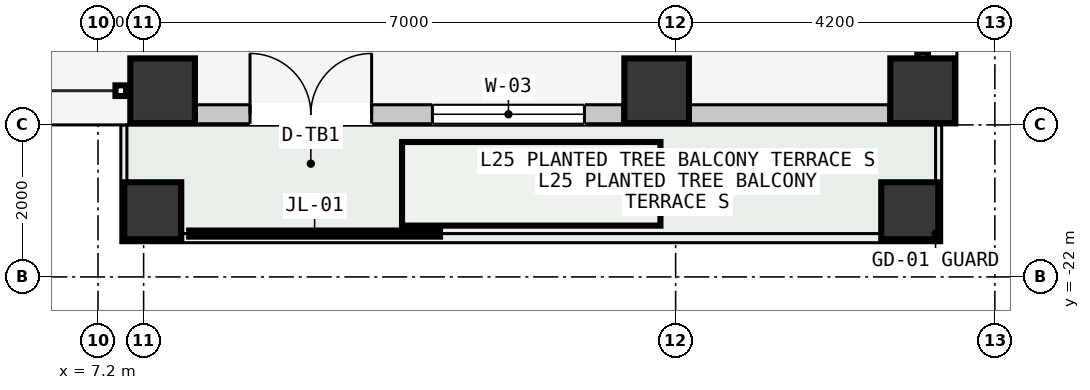
"""IFC4 building model, lengths in metres.
Left out: names, types, materials, properties, quantities, classifications, styles, units other than length and angle.
Written with IfcOpenShell. Run it as: python <this file> out.ifc"""

import sys

from ifc_helpers import new_model, si_unit, direction, frame, frame_2d, origin, origin_2d, place, context, subcontext, project, spatial, rectangle, hollow_rectangle, extrude, element, fill, save


model = new_model("IFC4")
c1 = context("Model", 3, precision=1e-05, world=origin(), true_north=direction((0.0, 1.0)))
c2 = subcontext(c1, "Body", "Model", "MODEL_VIEW")
j1 = project(units=[si_unit("LENGTHUNIT", "METRE"), si_unit("PLANEANGLEUNIT", "RADIAN")], contexts=[c1])
p1 = place(None, origin())
s1 = spatial("IfcSite", under=j1, at=p1, CompositionType="ELEMENT")
p2 = place(p1, origin())
s2 = spatial("IfcBuilding", under=s1, at=p2, CompositionType="ELEMENT")
p3 = place(p2, frame((0.0, 0.0, 99.0)))
s3 = spatial("IfcBuildingStorey", under=s2, at=p3, CompositionType="ELEMENT", Elevation=99.0)
for number, where, z_axis, x_axis in (
    (1, (8.05, -19.55, 0.0), (0.0, 0.0, 1.0), (1.0, 0.0, 0.0)),
    (2, (14.55, -19.55, 0.0), (0.0, 0.0, 1.0), (1.0, 0.0, 0.0)),
    (3, (18.05, -19.55, 0.0), (0.0, 0.0, 1.0), (1.0, 0.0, 0.0)),
):
    element("IfcColumn", number, at=place(p3, frame(where, z_axis=z_axis, x_axis=x_axis)), inside=s3, PredefinedType="COLUMN", context=c2, shape_type="SweptSolid", body=[
        extrude(hollow_rectangle(XDim=0.85, YDim=0.85, WallThickness=0.04, at=origin_2d()), origin(), (0.0, 0.0, 1.0), 3.6),
    ])
for number, where, z_axis, x_axis in (
    (4, (7.92, -21.13, 0.0), (0.0, 0.0, 1.0), (1.0, 0.0, 0.0)),
    (5, (17.88, -21.13, 0.0), (0.0, 0.0, 1.0), (1.0, 0.0, 0.0)),
):
    element("IfcColumn", number, at=place(p3, frame(where, z_axis=z_axis, x_axis=x_axis)), inside=s3, PredefinedType="COLUMN", context=c2, shape_type="SweptSolid", body=[
        extrude(hollow_rectangle(XDim=0.75, YDim=0.75, WallThickness=0.032, at=origin_2d()), origin(), (0.0, 0.0, 1.0), 3.6),
    ])
p4 = place(p3, frame((8.495, -19.86, 0.0), z_axis=(0.0, 0.0, 1.0), x_axis=(1.0, 0.0, 0.0)))
e6 = element("IfcWall", 6, at=p4, inside=s3, PredefinedType="STANDARD", context=c2, shape_type="SweptSolid", body=[
    extrude(rectangle(XDim=5.61, YDim=0.25, at=frame_2d((2.805, 0.0))), origin(), (0.0, 0.0, 1.0), 3.4),
])
p5 = place(p4, frame((0.705, 0.0, 0.0)))
e7 = element("IfcOpeningElement", 7, at=p5, cuts=e6, PredefinedType="OPENING", context=c2, shape_type="SweptSolid", body=[
    extrude(rectangle(XDim=1.6, YDim=2.2, at=frame_2d((0.8, 1.1))), frame((0.0, 0.135, 0.0), z_axis=(0.0, -1.0, 0.0), x_axis=(1.0, 0.0, 0.0)), (0.0, 0.0, 1.0), 0.27),
])
p6 = place(p4, frame((3.105, 0.0, 0.85)))
e8 = element("IfcOpeningElement", 8, at=p6, cuts=e6, PredefinedType="OPENING", context=c2, shape_type="SweptSolid", body=[
    extrude(rectangle(XDim=2.0, YDim=2.1, at=frame_2d((1.0, 1.05))), frame((0.0, 0.135, 0.0), z_axis=(0.0, -1.0, 0.0), x_axis=(1.0, 0.0, 0.0)), (0.0, 0.0, 1.0), 0.27),
])
p7 = place(p3, frame((14.995, -19.86, 0.0), z_axis=(0.0, 0.0, 1.0), x_axis=(1.0, 0.0, 0.0)))
e9 = element("IfcWall", 9, at=p7, inside=s3, PredefinedType="STANDARD", context=c2, shape_type="SweptSolid", body=[
    extrude(rectangle(XDim=2.61, YDim=0.25, at=frame_2d((1.305, 0.0))), origin(), (0.0, 0.0, 1.0), 3.4),
])
p8 = place(p5, origin())
e10 = element("IfcDoor", 10, at=p8, inside=s3, OperationType="DOUBLE_DOOR_SINGLE_SWING", PredefinedType="DOOR", context=c2, shape_type="SweptSolid", body=[
    extrude(rectangle(XDim=1.6, YDim=2.2, at=frame_2d((0.8, 1.1))), frame((0.0, 0.025, 0.0), z_axis=(0.0, -1.0, 0.0), x_axis=(1.0, 0.0, 0.0)), (0.0, 0.0, 1.0), 0.05),
])
fill(e7, e10)
p9 = place(p6, origin())
e11 = element("IfcWindow", 11, at=p9, inside=s3, PartitioningType="SINGLE_PANEL", PredefinedType="WINDOW", context=c2, shape_type="SweptSolid", body=[
    extrude(rectangle(XDim=2.0, YDim=2.1, at=frame_2d((1.0, 1.05))), frame((0.0, 0.03, 0.0), z_axis=(0.0, -1.0, 0.0), x_axis=(1.0, 0.0, 0.0)), (0.0, 0.0, 1.0), 0.06),
])
fill(e8, e11)
save(model, sys.argv[1])
